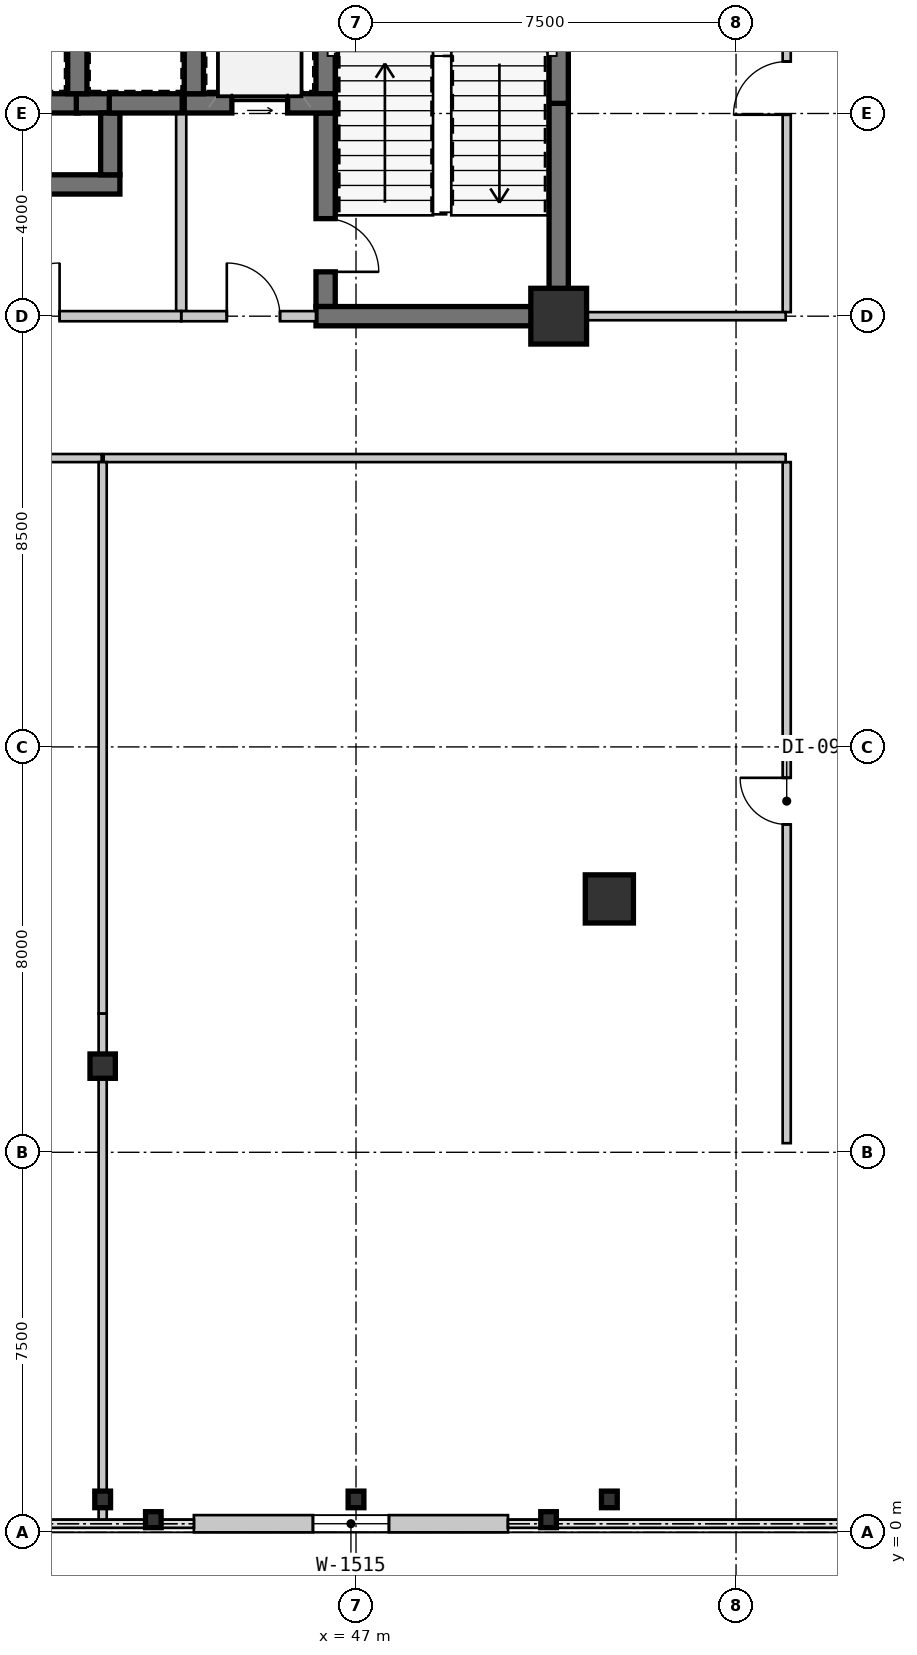
"""IFC4 building model, lengths in metres.
Left out: names, types, materials, properties, quantities, classifications, styles, units other than length and angle.
Written with IfcOpenShell. Run it as: python <this file> out.ifc"""

import sys

from ifc_helpers import new_model, si_unit, direction, frame, frame_2d, origin, origin_2d, place, context, subcontext, project, spatial, rectangle, i_section, extrude, source, transform, mapped, element, fill, save


model = new_model("IFC4")
c1 = context("Model", 3, precision=1e-05, world=origin(), true_north=direction((0.0, 1.0)))
c2 = subcontext(c1, "Body", "Model", "MODEL_VIEW")
j1 = project(units=[si_unit("LENGTHUNIT", "METRE"), si_unit("PLANEANGLEUNIT", "RADIAN")], contexts=[c1])
p1 = place(None, origin())
s1 = spatial("IfcSite", under=j1, at=p1, CompositionType="ELEMENT")
p2 = place(p1, origin())
s2 = spatial("IfcBuilding", under=s1, at=p2, CompositionType="ELEMENT")
p3 = place(p2, frame((0.0, 0.0, 4.55)))
s3 = spatial("IfcBuildingStorey", under=s2, at=p3, CompositionType="ELEMENT", Elevation=4.55)
m1 = source(origin(), c2, "Body", "SweptSolid", [
    extrude(rectangle(XDim=1.1, YDim=1.1, at=origin_2d()), origin(), (0.0, 0.0, 1.0), 3.85),
])
p4 = place(p3, frame((51.0, 24.0, 0.0), z_axis=(0.0, 0.0, 1.0), x_axis=(1.0, 0.0, 0.0)))
e1 = element("IfcColumn", 1, at=p4, inside=s3, PredefinedType="COLUMN", context=c2, shape_type="MappedRepresentation", body=[
    mapped(m1, transform((0.0, 0.0, 0.0), scale=1.0)),
])
m2 = source(origin(), c2, "Body", "SweptSolid", [
    extrude(i_section(OverallWidth=0.5, OverallDepth=0.48, WebThickness=0.028, FlangeThickness=0.044, at=origin_2d()), origin(), (0.0, 0.0, 1.0), 3.85),
])
p5 = place(p3, frame((42.0, 9.2, 0.0), z_axis=(0.0, 0.0, 1.0), x_axis=(1.0, 0.0, 0.0)))
e2 = element("IfcColumn", 2, at=p5, inside=s3, PredefinedType="COLUMN", context=c2, shape_type="MappedRepresentation", body=[
    mapped(m2, transform((0.0, 0.0, 0.0), scale=1.0)),
])
m3 = source(origin(), c2, "Body", "SweptSolid", [
    extrude(rectangle(XDim=0.95, YDim=0.95, at=origin_2d()), origin(), (0.0, 0.0, 1.0), 3.85),
])
p6 = place(p3, frame((52.0, 12.5, 0.0), z_axis=(0.0, 0.0, 1.0), x_axis=(1.0, 0.0, 0.0)))
e3 = element("IfcColumn", 3, at=p6, inside=s3, PredefinedType="COLUMN", context=c2, shape_type="MappedRepresentation", body=[
    mapped(m3, transform((0.0, 0.0, 0.0), scale=1.0)),
])
m4 = source(origin(), c2, "Body", "SweptSolid", [
    extrude(i_section(OverallWidth=0.311, OverallDepth=0.327, WebThickness=0.016, FlangeThickness=0.025, at=origin_2d()), origin(), (0.0, 0.0, 1.0), 3.85),
])
for number, where, z_axis, x_axis in (
    (4, (42.0, 0.65, 0.0), (0.0, 0.0, 1.0), (1.0, 0.0, 0.0)),
    (5, (47.0, 0.65, 0.0), (0.0, 0.0, 1.0), (1.0, 0.0, 0.0)),
    (6, (52.0, 0.65, 0.0), (0.0, 0.0, 1.0), (1.0, 0.0, 0.0)),
):
    element("IfcColumn", number, at=place(p3, frame(where, z_axis=z_axis, x_axis=x_axis)), inside=s3, PredefinedType="COLUMN", context=c2, shape_type="MappedRepresentation", body=[
        mapped(m4, transform((0.0, 0.0, 0.0), scale=1.0)),
    ])
m5 = source(origin(), c2, "Body", "SweptSolid", [
    extrude(i_section(OverallWidth=0.307, OverallDepth=0.315, WebThickness=0.012, FlangeThickness=0.019, at=origin_2d()), origin(), (0.0, 0.0, 1.0), 3.85),
])
for number, where, z_axis, x_axis in (
    (7, (43.0, 0.25, 0.0), (0.0, 0.0, 1.0), (1.0, 0.0, 0.0)),
    (8, (50.8, 0.25, 0.0), (0.0, 0.0, 1.0), (1.0, 0.0, 0.0)),
):
    element("IfcColumn", number, at=place(p3, frame(where, z_axis=z_axis, x_axis=x_axis)), inside=s3, PredefinedType="PILASTER", context=c2, shape_type="MappedRepresentation", body=[
        mapped(m5, transform((0.0, 0.0, 0.0), scale=1.0)),
    ])
m6 = source(origin(), c2, "Body", "SweptSolid", [
    extrude(rectangle(XDim=6.2, YDim=0.34, at=frame_2d((3.1, 0.0))), origin(), (0.0, 0.0, 1.0), 3.59),
])
p7 = place(p3, frame((43.8, 0.17, 0.0), z_axis=(0.0, 0.0, 1.0), x_axis=(1.0, 0.0, 0.0)))
e9 = element("IfcWall", 9, at=p7, inside=s3, PredefinedType="SOLIDWALL", context=c2, shape_type="MappedRepresentation", body=[
    mapped(m6, transform((0.0, 0.0, 0.0), scale=1.0)),
])
m7 = source(origin(), c2, "Body", "SweptSolid", [
    extrude(rectangle(XDim=1.5, YDim=1.5, at=frame_2d((0.75, 0.75))), frame((0.0, 0.18, 0.0), z_axis=(0.0, -1.0, 0.0), x_axis=(1.0, 0.0, 0.0)), (0.0, 0.0, 1.0), 0.36),
])
p8 = place(p7, frame((2.35, 0.0, 0.9)))
e10 = element("IfcOpeningElement", 10, at=p8, cuts=e9, PredefinedType="OPENING", context=c2, shape_type="MappedRepresentation", body=[
    mapped(m7, transform((0.0, 0.0, 0.0), scale=1.0)),
])
m8 = source(origin(), c2, "Body", "SweptSolid", [
    extrude(rectangle(XDim=4.01, YDim=0.38, at=frame_2d((2.005, 0.0))), origin(), (0.0, 0.0, 1.0), 3.59),
])
p9 = place(p3, frame((51.0, 24.19, 0.0), z_axis=(0.0, 0.0, 1.0), x_axis=(0.0, 1.0, 0.0)))
e11 = element("IfcWall", 11, at=p9, inside=s3, PredefinedType="SHEAR", context=c2, shape_type="MappedRepresentation", body=[
    mapped(m8, transform((0.0, 0.0, 0.0), scale=1.0)),
])
m9 = source(origin(), c2, "Body", "SweptSolid", [
    extrude(rectangle(XDim=3.61, YDim=0.38, at=frame_2d((1.805, 0.0))), origin(), (0.0, 0.0, 1.0), 3.59),
])
p10 = place(p3, frame((51.0, 28.2, 0.0), z_axis=(0.0, 0.0, 1.0), x_axis=(0.0, 1.0, 0.0)))
e12 = element("IfcWall", 12, at=p10, inside=s3, PredefinedType="SHEAR", context=c2, shape_type="MappedRepresentation", body=[
    mapped(m9, transform((0.0, 0.0, 0.0), scale=1.0)),
])
m10 = source(origin(), c2, "Body", "SweptSolid", [
    extrude(rectangle(XDim=3.42, YDim=0.38, at=frame_2d((1.71, 0.0))), origin(), (0.0, 0.0, 1.0), 3.59),
])
p11 = place(p3, frame((46.4, 31.81, 0.0), z_axis=(0.0, 0.0, 1.0), x_axis=(0.0, -1.0, 0.0)))
e13 = element("IfcWall", 13, at=p11, inside=s3, PredefinedType="SHEAR", context=c2, shape_type="MappedRepresentation", body=[
    mapped(m10, transform((0.0, 0.0, 0.0), scale=1.0)),
])
m11 = source(origin(), c2, "Body", "SweptSolid", [
    extrude(rectangle(XDim=3.82, YDim=0.38, at=frame_2d((1.91, 0.0))), origin(), (0.0, 0.0, 1.0), 3.59),
])
p12 = place(p3, frame((46.4, 28.01, 0.0), z_axis=(0.0, 0.0, 1.0), x_axis=(0.0, -1.0, 0.0)))
e14 = element("IfcWall", 14, at=p12, inside=s3, PredefinedType="SHEAR", context=c2, shape_type="MappedRepresentation", body=[
    mapped(m11, transform((0.0, 0.0, 0.0), scale=1.0)),
])
m12 = source(origin(), c2, "Body", "SweptSolid", [
    extrude(rectangle(XDim=1.05, YDim=2.1, at=frame_2d((0.525, 1.05))), frame((0.0, 0.2, 0.0), z_axis=(0.0, -1.0, 0.0), x_axis=(1.0, 0.0, 0.0)), (0.0, 0.0, 1.0), 0.4),
])
p13 = place(p12, frame((2.085, 0.0, 0.0)))
e15 = element("IfcOpeningElement", 15, at=p13, cuts=e14, PredefinedType="OPENING", context=c2, shape_type="MappedRepresentation", body=[
    mapped(m12, transform((0.0, 0.0, 0.0), scale=1.0)),
])
m13 = source(origin(), c2, "Body", "SweptSolid", [
    extrude(rectangle(XDim=4.98, YDim=0.38, at=frame_2d((2.49, 0.0))), origin(), (0.0, 0.0, 1.0), 3.59),
])
p14 = place(p3, frame((46.21, 24.0, 0.0), z_axis=(0.0, 0.0, 1.0), x_axis=(1.0, 0.0, 0.0)))
e16 = element("IfcWall", 16, at=p14, inside=s3, PredefinedType="SHEAR", context=c2, shape_type="MappedRepresentation", body=[
    mapped(m13, transform((0.0, 0.0, 0.0), scale=1.0)),
])
m14 = source(origin(), c2, "Body", "SweptSolid", [
    extrude(rectangle(XDim=2.98, YDim=0.38, at=frame_2d((1.49, 0.0))), origin(), (0.0, 0.0, 1.0), 3.59),
])
p15 = place(p3, frame((43.61, 28.2, 0.0), z_axis=(0.0, 0.0, 1.0), x_axis=(1.0, 0.0, 0.0)))
e17 = element("IfcWall", 17, at=p15, inside=s3, PredefinedType="SHEAR", context=c2, shape_type="MappedRepresentation", body=[
    mapped(m14, transform((0.0, 0.0, 0.0), scale=1.0)),
])
m15 = source(origin(), c2, "Body", "SweptSolid", [
    extrude(rectangle(XDim=1.1, YDim=2.15, at=frame_2d((0.55, 1.075))), frame((0.0, 0.2, 0.0), z_axis=(0.0, -1.0, 0.0), x_axis=(1.0, 0.0, 0.0)), (0.0, 0.0, 1.0), 0.4),
])
p16 = place(p15, frame((0.94, 0.0, 0.0)))
e18 = element("IfcOpeningElement", 18, at=p16, cuts=e17, PredefinedType="OPENING", context=c2, shape_type="MappedRepresentation", body=[
    mapped(m15, transform((0.0, 0.0, 0.0), scale=1.0)),
])
p17 = place(p3, frame((43.8, 31.81, 0.0), z_axis=(0.0, 0.0, 1.0), x_axis=(0.0, -1.0, 0.0)))
e19 = element("IfcWall", 19, at=p17, inside=s3, PredefinedType="SHEAR", context=c2, shape_type="MappedRepresentation", body=[
    mapped(m10, transform((0.0, 0.0, 0.0), scale=1.0)),
])
m16 = source(origin(), c2, "Body", "SweptSolid", [
    extrude(rectangle(XDim=3.91, YDim=0.2, at=frame_2d((1.955, 0.0))), origin(), (0.0, 0.0, 1.0), 3.59),
])
p18 = place(p3, frame((43.55, 28.01, 0.0), z_axis=(0.0, 0.0, 1.0), x_axis=(0.0, -1.0, 0.0)))
e20 = element("IfcWall", 20, at=p18, inside=s3, PredefinedType="SOLIDWALL", context=c2, shape_type="MappedRepresentation", body=[
    mapped(m16, transform((0.0, 0.0, 0.0), scale=1.0)),
])
m17 = source(origin(), c2, "Body", "SweptSolid", [
    extrude(rectangle(XDim=2.66, YDim=0.2, at=frame_2d((1.33, 0.0))), origin(), (0.0, 0.0, 1.0), 3.057),
])
p19 = place(p3, frame((43.55, 24.0, 0.0), z_axis=(0.0, 0.0, 1.0), x_axis=(1.0, 0.0, 0.0)))
e21 = element("IfcWall", 21, at=p19, inside=s3, PredefinedType="SOLIDWALL", context=c2, shape_type="MappedRepresentation", body=[
    mapped(m17, transform((0.0, 0.0, 0.0), scale=1.0)),
])
m18 = source(origin(), c2, "Body", "SweptSolid", [
    extrude(rectangle(XDim=1.05, YDim=2.1, at=frame_2d((0.525, 1.05))), frame((0.0, 0.11, 0.0), z_axis=(0.0, -1.0, 0.0), x_axis=(1.0, 0.0, 0.0)), (0.0, 0.0, 1.0), 0.22),
])
p20 = place(p19, frame((0.9, 0.0, 0.0)))
e22 = element("IfcOpeningElement", 22, at=p20, cuts=e21, PredefinedType="OPENING", context=c2, shape_type="MappedRepresentation", body=[
    mapped(m18, transform((0.0, 0.0, 0.0), scale=1.0)),
])
m19 = source(origin(), c2, "Body", "SweptSolid", [
    extrude(rectangle(XDim=1.32, YDim=0.38, at=frame_2d((0.66, 0.0))), origin(), (0.0, 0.0, 1.0), 3.59),
])
p21 = place(p3, frame((41.52, 28.2, 0.0), z_axis=(0.0, 0.0, 1.0), x_axis=(-1.0, 0.0, 0.0)))
e23 = element("IfcWall", 23, at=p21, inside=s3, PredefinedType="SHEAR", context=c2, shape_type="MappedRepresentation", body=[
    mapped(m19, transform((0.0, 0.0, 0.0), scale=1.0)),
])
m20 = source(origin(), c2, "Body", "SweptSolid", [
    extrude(rectangle(XDim=0.67, YDim=0.38, at=frame_2d((0.335, 0.0))), origin(), (0.0, 0.0, 1.0), 3.59),
])
p22 = place(p3, frame((42.15, 28.2, 0.0), z_axis=(0.0, 0.0, 1.0), x_axis=(-1.0, 0.0, 0.0)))
e24 = element("IfcWall", 24, at=p22, inside=s3, PredefinedType="SHEAR", context=c2, shape_type="MappedRepresentation", body=[
    mapped(m20, transform((0.0, 0.0, 0.0), scale=1.0)),
])
m21 = source(origin(), c2, "Body", "SweptSolid", [
    extrude(rectangle(XDim=2.33, YDim=0.38, at=frame_2d((1.165, 0.0))), origin(), (0.0, 0.0, 1.0), 3.59),
])
p23 = place(p3, frame((40.01, 26.6, 0.0), z_axis=(0.0, 0.0, 1.0), x_axis=(1.0, 0.0, 0.0)))
e25 = element("IfcWall", 25, at=p23, inside=s3, PredefinedType="SHEAR", context=c2, shape_type="MappedRepresentation", body=[
    mapped(m21, transform((0.0, 0.0, 0.0), scale=1.0)),
])
m22 = source(origin(), c2, "Body", "SweptSolid", [
    extrude(rectangle(XDim=1.22, YDim=0.38, at=frame_2d((0.61, 0.0))), origin(), (0.0, 0.0, 1.0), 3.59),
])
p24 = place(p3, frame((42.15, 26.79, 0.0), z_axis=(0.0, 0.0, 1.0), x_axis=(0.0, 1.0, 0.0)))
e26 = element("IfcWall", 26, at=p24, inside=s3, PredefinedType="SHEAR", context=c2, shape_type="MappedRepresentation", body=[
    mapped(m22, transform((0.0, 0.0, 0.0), scale=1.0)),
])
p25 = place(p3, frame((41.5, 28.39, 0.0), z_axis=(0.0, 0.0, 1.0), x_axis=(0.0, 1.0, 0.0)))
e27 = element("IfcWall", 27, at=p25, inside=s3, PredefinedType="SHEAR", context=c2, shape_type="MappedRepresentation", body=[
    mapped(m10, transform((0.0, 0.0, 0.0), scale=1.0)),
])
m23 = source(origin(), c2, "Body", "SweptSolid", [
    extrude(rectangle(XDim=1.44, YDim=0.38, at=frame_2d((0.72, 0.0))), origin(), (0.0, 0.0, 1.0), 3.59),
])
p26 = place(p3, frame((42.13, 28.2, 0.0), z_axis=(0.0, 0.0, 1.0), x_axis=(1.0, 0.0, 0.0)))
e28 = element("IfcWall", 28, at=p26, inside=s3, PredefinedType="SHEAR", context=c2, shape_type="MappedRepresentation", body=[
    mapped(m23, transform((0.0, 0.0, 0.0), scale=1.0)),
])
m24 = source(origin(), c2, "Body", "SweptSolid", [
    extrude(rectangle(XDim=4.35, YDim=0.2, at=frame_2d((2.175, 0.0))), origin(), (0.0, 0.0, 1.0), 3.057),
])
p27 = place(p3, frame((43.55, 24.0, 0.0), z_axis=(0.0, 0.0, 1.0), x_axis=(-1.0, 0.0, 0.0)))
e29 = element("IfcWall", 29, at=p27, inside=s3, PredefinedType="SOLIDWALL", context=c2, shape_type="MappedRepresentation", body=[
    mapped(m24, transform((0.0, 0.0, 0.0), scale=1.0)),
])
p28 = place(p27, frame((2.4, 0.0, 0.0)))
e30 = element("IfcOpeningElement", 30, at=p28, cuts=e29, PredefinedType="OPENING", context=c2, shape_type="MappedRepresentation", body=[
    mapped(m18, transform((0.0, 0.0, 0.0), scale=1.0)),
])
m25 = source(origin(), c2, "Body", "SweptSolid", [
    extrude(rectangle(XDim=13.959, YDim=0.16, at=frame_2d((6.98, 0.0))), origin(), (0.0, 0.0, 1.0), 3.59),
])
p29 = place(p3, frame((41.98, 21.2, 0.0), z_axis=(0.0, 0.0, 1.0), x_axis=(-1.0, 0.0, 0.0)))
e31 = element("IfcWall", 31, at=p29, inside=s3, PredefinedType="PARTITIONING", context=c2, shape_type="MappedRepresentation", body=[
    mapped(m25, transform((0.0, 0.0, 0.0), scale=1.0)),
])
m26 = source(origin(), c2, "Body", "SweptSolid", [
    extrude(rectangle(XDim=1.05, YDim=2.1, at=frame_2d((0.525, 1.05))), frame((0.0, 0.09, 0.0), z_axis=(0.0, -1.0, 0.0), x_axis=(1.0, 0.0, 0.0)), (0.0, 0.0, 1.0), 0.18),
])
p30 = place(p29, frame((6.455, 0.0, 0.0)))
e32 = element("IfcOpeningElement", 32, at=p30, cuts=e31, PredefinedType="OPENING", context=c2, shape_type="MappedRepresentation", body=[
    mapped(m26, transform((0.0, 0.0, 0.0), scale=1.0)),
])
m27 = source(origin(), c2, "Body", "SweptSolid", [
    extrude(rectangle(XDim=13.44, YDim=0.16, at=frame_2d((6.72, 0.0))), origin(), (0.0, 0.0, 1.0), 3.59),
])
p31 = place(p3, frame((55.5, 7.68, 0.0), z_axis=(0.0, 0.0, 1.0), x_axis=(0.0, 1.0, 0.0)))
e33 = element("IfcWall", 33, at=p31, inside=s3, PredefinedType="PARTITIONING", context=c2, shape_type="MappedRepresentation", body=[
    mapped(m27, transform((0.0, 0.0, 0.0), scale=1.0)),
])
m28 = source(origin(), c2, "Body", "SweptSolid", [
    extrude(rectangle(XDim=0.92, YDim=2.1, at=frame_2d((0.46, 1.05))), frame((0.0, 0.09, 0.0), z_axis=(0.0, -1.0, 0.0), x_axis=(1.0, 0.0, 0.0)), (0.0, 0.0, 1.0), 0.18),
])
p32 = place(p31, frame((6.29, 0.0, 0.0)))
e34 = element("IfcOpeningElement", 34, at=p32, cuts=e33, PredefinedType="OPENING", context=c2, shape_type="MappedRepresentation", body=[
    mapped(m28, transform((0.0, 0.0, 0.0), scale=1.0)),
])
m29 = source(origin(), c2, "Body", "SweptSolid", [
    extrude(rectangle(XDim=13.459, YDim=0.16, at=frame_2d((6.73, 0.0))), origin(), (0.0, 0.0, 1.0), 3.59),
])
p33 = place(p3, frame((55.48, 21.2, 0.0), z_axis=(0.0, 0.0, 1.0), x_axis=(-1.0, 0.0, 0.0)))
e35 = element("IfcWall", 35, at=p33, inside=s3, PredefinedType="PARTITIONING", context=c2, shape_type="MappedRepresentation", body=[
    mapped(m29, transform((0.0, 0.0, 0.0), scale=1.0)),
])
m30 = source(origin(), c2, "Body", "SweptSolid", [
    extrude(rectangle(XDim=8.9, YDim=0.16, at=frame_2d((4.45, 0.0))), origin(), (0.0, 0.0, 1.0), 3.59),
])
p34 = place(p3, frame((55.5, 24.08, 0.0), z_axis=(0.0, 0.0, 1.0), x_axis=(0.0, 1.0, 0.0)))
e36 = element("IfcWall", 36, at=p34, inside=s3, PredefinedType="PARTITIONING", context=c2, shape_type="MappedRepresentation", body=[
    mapped(m30, transform((0.0, 0.0, 0.0), scale=1.0)),
])
p35 = place(p34, frame((3.895, 0.0, 0.0)))
e37 = element("IfcOpeningElement", 37, at=p35, cuts=e36, PredefinedType="OPENING", context=c2, shape_type="MappedRepresentation", body=[
    mapped(m26, transform((0.0, 0.0, 0.0), scale=1.0)),
])
m31 = source(origin(), c2, "Body", "SweptSolid", [
    extrude(rectangle(XDim=4.29, YDim=0.16, at=frame_2d((2.145, 0.0))), origin(), (0.0, 0.0, 1.0), 3.59),
])
p36 = place(p3, frame((51.19, 24.0, 0.0), z_axis=(0.0, 0.0, 1.0), x_axis=(1.0, 0.0, 0.0)))
e38 = element("IfcWall", 38, at=p36, inside=s3, PredefinedType="PARTITIONING", context=c2, shape_type="MappedRepresentation", body=[
    mapped(m31, transform((0.0, 0.0, 0.0), scale=1.0)),
])
m32 = source(origin(), c2, "Body", "SweptSolid", [
    extrude(rectangle(XDim=10.884, YDim=0.16, at=frame_2d((5.442, 0.0))), origin(), (0.0, 0.0, 1.0), 3.59),
])
p37 = place(p3, frame((42.0, 21.12, 0.0), z_axis=(0.0, 0.0, 1.0), x_axis=(0.0, -1.0, 0.0)))
e39 = element("IfcWall", 39, at=p37, inside=s3, PredefinedType="PARTITIONING", context=c2, shape_type="MappedRepresentation", body=[
    mapped(m32, transform((0.0, 0.0, 0.0), scale=1.0)),
])
m33 = source(origin(), c2, "Body", "SweptSolid", [
    extrude(rectangle(XDim=1.051, YDim=0.16, at=frame_2d((0.526, 0.0))), origin(), (0.0, 0.0, 1.0), 2.988),
])
p38 = place(p3, frame((42.0, 10.236, 0.0), z_axis=(0.0, 0.0, 1.0), x_axis=(0.0, -1.0, 0.0)))
e40 = element("IfcWall", 40, at=p38, inside=s3, PredefinedType="PARTITIONING", context=c2, shape_type="MappedRepresentation", body=[
    mapped(m33, transform((0.0, 0.0, 0.0), scale=1.0)),
])
m34 = source(origin(), c2, "Body", "SweptSolid", [
    extrude(rectangle(XDim=8.535, YDim=0.16, at=frame_2d((4.268, 0.0))), origin(), (0.0, 0.0, 1.0), 3.057),
])
p39 = place(p3, frame((42.0, 9.185, 0.0), z_axis=(0.0, 0.0, 1.0), x_axis=(0.0, -1.0, 0.0)))
e41 = element("IfcWall", 41, at=p39, inside=s3, PredefinedType="PARTITIONING", context=c2, shape_type="MappedRepresentation", body=[
    mapped(m34, transform((0.0, 0.0, 0.0), scale=1.0)),
])
m35 = source(origin(), c2, "Body", "SweptSolid", [
    extrude(rectangle(XDim=0.42, YDim=0.16, at=frame_2d((0.21, 0.0))), origin(), (0.0, 0.0, 1.0), 3.59),
])
p40 = place(p3, frame((42.0, 0.65, 0.0), z_axis=(0.0, 0.0, 1.0), x_axis=(0.0, -1.0, 0.0)))
e42 = element("IfcWall", 42, at=p40, inside=s3, PredefinedType="PARTITIONING", context=c2, shape_type="MappedRepresentation", body=[
    mapped(m35, transform((0.0, 0.0, 0.0), scale=1.0)),
])
m36 = source(origin(), c2, "Body", "SweptSolid", [
    extrude(rectangle(XDim=1.5, YDim=1.5, at=frame_2d((0.75, 0.75))), frame((0.0, 0.03, 0.0), z_axis=(0.0, -1.0, 0.0), x_axis=(1.0, 0.0, 0.0)), (0.0, 0.0, 1.0), 0.06),
])
p41 = place(p8, origin())
e43 = element("IfcWindow", 43, at=p41, inside=s3, PartitioningType="SINGLE_PANEL", PredefinedType="WINDOW", context=c2, shape_type="MappedRepresentation", body=[
    mapped(m36, transform((0.0, 0.0, 0.0), scale=1.0)),
])
fill(e10, e43)
m37 = source(origin(), c2, "Body", "SweptSolid", [
    extrude(rectangle(XDim=1.05, YDim=2.1, at=frame_2d((0.525, 1.05))), frame((0.0, 0.025, 0.0), z_axis=(0.0, -1.0, 0.0), x_axis=(1.0, 0.0, 0.0)), (0.0, 0.0, 1.0), 0.05),
])
p42 = place(p13, origin())
e44 = element("IfcDoor", 44, at=p42, inside=s3, OperationType="SINGLE_SWING_RIGHT", PredefinedType="DOOR", context=c2, shape_type="MappedRepresentation", body=[
    mapped(m37, transform((0.0, 0.0, 0.0), scale=1.0)),
])
fill(e15, e44)
m38 = source(origin(), c2, "Body", "SweptSolid", [
    extrude(rectangle(XDim=1.1, YDim=2.15, at=frame_2d((0.55, 1.075))), frame((0.0, 0.025, 0.0), z_axis=(0.0, -1.0, 0.0), x_axis=(1.0, 0.0, 0.0)), (0.0, 0.0, 1.0), 0.05),
])
p43 = place(p16, origin())
e45 = element("IfcDoor", 45, at=p43, inside=s3, OperationType="SLIDING_TO_LEFT", PredefinedType="DOOR", context=c2, shape_type="MappedRepresentation", body=[
    mapped(m38, transform((0.0, 0.0, 0.0), scale=1.0)),
])
fill(e18, e45)
p44 = place(p20, origin())
e46 = element("IfcDoor", 46, at=p44, inside=s3, OperationType="SINGLE_SWING_LEFT", PredefinedType="DOOR", context=c2, shape_type="MappedRepresentation", body=[
    mapped(m37, transform((0.0, 0.0, 0.0), scale=1.0)),
])
fill(e22, e46)
p45 = place(p28, frame((1.05, 0.0, 0.0), z_axis=(0.0, 0.0, 1.0), x_axis=(-1.0, 0.0, 0.0)))
e47 = element("IfcDoor", 47, at=p45, inside=s3, OperationType="SINGLE_SWING_RIGHT", PredefinedType="DOOR", context=c2, shape_type="MappedRepresentation", body=[
    mapped(m37, transform((0.0, 0.0, 0.0), scale=1.0)),
])
fill(e30, e47)
m39 = source(origin(), c2, "Body", "SweptSolid", [
    extrude(rectangle(XDim=0.92, YDim=2.1, at=frame_2d((0.46, 1.05))), frame((0.0, 0.025, 0.0), z_axis=(0.0, -1.0, 0.0), x_axis=(1.0, 0.0, 0.0)), (0.0, 0.0, 1.0), 0.05),
])
p46 = place(p32, origin())
e48 = element("IfcDoor", 48, at=p46, inside=s3, OperationType="SINGLE_SWING_RIGHT", PredefinedType="DOOR", context=c2, shape_type="MappedRepresentation", body=[
    mapped(m39, transform((0.0, 0.0, 0.0), scale=1.0)),
])
fill(e34, e48)
p47 = place(p35, origin())
e49 = element("IfcDoor", 49, at=p47, inside=s3, OperationType="SINGLE_SWING_LEFT", PredefinedType="DOOR", context=c2, shape_type="MappedRepresentation", body=[
    mapped(m37, transform((0.0, 0.0, 0.0), scale=1.0)),
])
fill(e37, e49)
save(model, sys.argv[1])
